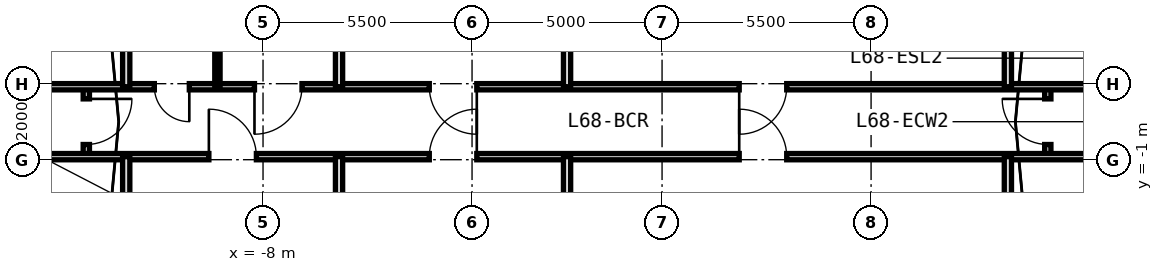
"""IFC4 building model, lengths in metres.
Left out: names, types, materials, properties, quantities, classifications, styles, units other than length and angle.
Written with IfcOpenShell. Run it as: python <this file> out.ifc"""

import sys

from ifc_helpers import new_model, si_unit, direction, frame, frame_2d, origin, place, context, subcontext, project, spatial, rectangle, extrude, source, transform, mapped, element, fill, save


model = new_model("IFC4")
c1 = context("Model", 3, precision=1e-05, world=origin(), true_north=direction((0.0, 1.0)))
c2 = subcontext(c1, "Body", "Model", "MODEL_VIEW")
j1 = project(units=[si_unit("LENGTHUNIT", "METRE"), si_unit("PLANEANGLEUNIT", "RADIAN")], contexts=[c1])
p1 = place(None, origin())
s1 = spatial("IfcSite", under=j1, at=p1, CompositionType="ELEMENT")
p2 = place(p1, origin())
s2 = spatial("IfcBuilding", under=s1, at=p2, CompositionType="ELEMENT")
p3 = place(p2, frame((0.0, 0.0, 220.0)))
s3 = spatial("IfcBuildingStorey", under=s2, at=p3, CompositionType="ELEMENT", Elevation=220.0)
m1 = source(origin(), c2, "Body", "SweptSolid", [
    extrude(rectangle(XDim=1.84, YDim=0.165, at=frame_2d((0.92, 0.0))), origin(), (0.0, 0.0, 1.0), 2.745),
])
p4 = place(p3, frame((-12.65, -0.92, 0.0), z_axis=(0.0, 0.0, 1.0), x_axis=(0.0, 1.0, 0.0)))
e1 = element("IfcWall", 1, at=p4, inside=s3, PredefinedType="PARTITIONING", context=c2, shape_type="MappedRepresentation", body=[
    mapped(m1, transform((0.0, 0.0, 0.0), x_axis=(1.0, 0.0, 0.0), y_axis=(0.0, 1.0, 0.0), z_axis=(0.0, 0.0, 1.0), scale=1.0)),
])
p5 = place(p4, frame((0.32, 0.0, 0.0)))
e2 = element("IfcOpeningElement", 2, at=p5, cuts=e1, PredefinedType="OPENING", context=c2, shape_type="SweptSolid", body=[
    extrude(rectangle(XDim=1.2, YDim=2.15, at=frame_2d((0.6, 1.075))), frame((0.0, 0.093, 0.0), z_axis=(0.0, -1.0, 0.0), x_axis=(1.0, 0.0, 0.0)), (0.0, 0.0, 1.0), 0.185),
])
p6 = place(p3, frame((12.65, -0.92, 0.0), z_axis=(0.0, 0.0, 1.0), x_axis=(0.0, 1.0, 0.0)))
e3 = element("IfcWall", 3, at=p6, inside=s3, PredefinedType="PARTITIONING", context=c2, shape_type="MappedRepresentation", body=[
    mapped(m1, transform((0.0, 0.0, 0.0), x_axis=(1.0, 0.0, 0.0), y_axis=(0.0, 1.0, 0.0), z_axis=(0.0, 0.0, 1.0), scale=1.0)),
])
p7 = place(p6, frame((0.32, 0.0, 0.0)))
e4 = element("IfcOpeningElement", 4, at=p7, cuts=e3, PredefinedType="OPENING", context=c2, shape_type="SweptSolid", body=[
    extrude(rectangle(XDim=1.2, YDim=2.15, at=frame_2d((0.6, 1.075))), frame((0.0, 0.093, 0.0), z_axis=(0.0, -1.0, 0.0), x_axis=(1.0, 0.0, 0.0)), (0.0, 0.0, 1.0), 0.185),
])
m2 = source(origin(), c2, "Body", "SweptSolid", [
    extrude(rectangle(XDim=37.0, YDim=0.165, at=frame_2d((18.5, 0.0))), origin(), (0.0, 0.0, 1.0), 2.745),
])
p8 = place(p3, frame((-18.5, -0.92, 0.0), z_axis=(0.0, 0.0, 1.0), x_axis=(1.0, 0.0, 0.0)))
e5 = element("IfcWall", 5, at=p8, inside=s3, PredefinedType="PARTITIONING", context=c2, shape_type="MappedRepresentation", body=[
    mapped(m2, transform((0.0, 0.0, 0.0), x_axis=(1.0, 0.0, 0.0), y_axis=(0.0, 1.0, 0.0), z_axis=(0.0, 0.0, 1.0), scale=1.0)),
])
p9 = place(p8, frame((2.662, 0.0, 0.0)))
e6 = element("IfcOpeningElement", 6, at=p9, cuts=e5, PredefinedType="OPENING", context=c2, shape_type="SweptSolid", body=[
    extrude(rectangle(XDim=0.95, YDim=2.1, at=frame_2d((0.475, 1.05))), frame((0.0, 0.093, 0.0), z_axis=(0.0, -1.0, 0.0), x_axis=(1.0, 0.0, 0.0)), (0.0, 0.0, 1.0), 0.185),
])
p10 = place(p8, frame((33.388, 0.0, 0.0)))
e7 = element("IfcOpeningElement", 7, at=p10, cuts=e5, PredefinedType="OPENING", context=c2, shape_type="SweptSolid", body=[
    extrude(rectangle(XDim=0.95, YDim=2.1, at=frame_2d((0.475, 1.05))), frame((0.0, 0.093, 0.0), z_axis=(0.0, -1.0, 0.0), x_axis=(1.0, 0.0, 0.0)), (0.0, 0.0, 1.0), 0.185),
])
p11 = place(p8, frame((9.075, 0.0, 0.0)))
e8 = element("IfcOpeningElement", 8, at=p11, cuts=e5, PredefinedType="OPENING", context=c2, shape_type="SweptSolid", body=[
    extrude(rectangle(XDim=1.25, YDim=2.2, at=frame_2d((0.625, 1.1))), frame((0.0, 0.093, 0.0), z_axis=(0.0, -1.0, 0.0), x_axis=(1.0, 0.0, 0.0)), (0.0, 0.0, 1.0), 0.185),
])
p12 = place(p8, frame((14.875, 0.0, 0.0)))
e9 = element("IfcOpeningElement", 9, at=p12, cuts=e5, PredefinedType="OPENING", context=c2, shape_type="SweptSolid", body=[
    extrude(rectangle(XDim=1.25, YDim=2.2, at=frame_2d((0.625, 1.1))), frame((0.0, 0.093, 0.0), z_axis=(0.0, -1.0, 0.0), x_axis=(1.0, 0.0, 0.0)), (0.0, 0.0, 1.0), 0.185),
])
p13 = place(p8, frame((23.03, 0.0, 0.0)))
e10 = element("IfcOpeningElement", 10, at=p13, cuts=e5, PredefinedType="OPENING", context=c2, shape_type="SweptSolid", body=[
    extrude(rectangle(XDim=1.25, YDim=2.2, at=frame_2d((0.625, 1.1))), frame((0.0, 0.093, 0.0), z_axis=(0.0, -1.0, 0.0), x_axis=(1.0, 0.0, 0.0)), (0.0, 0.0, 1.0), 0.185),
])
p14 = place(p3, frame((-18.5, 0.92, 0.0), z_axis=(0.0, 0.0, 1.0), x_axis=(1.0, 0.0, 0.0)))
e11 = element("IfcWall", 11, at=p14, inside=s3, PredefinedType="PARTITIONING", context=c2, shape_type="MappedRepresentation", body=[
    mapped(m2, transform((0.0, 0.0, 0.0), x_axis=(1.0, 0.0, 0.0), y_axis=(0.0, 1.0, 0.0), z_axis=(0.0, 0.0, 1.0), scale=1.0)),
])
p15 = place(p14, frame((2.662, 0.0, 0.0)))
e12 = element("IfcOpeningElement", 12, at=p15, cuts=e11, PredefinedType="OPENING", context=c2, shape_type="SweptSolid", body=[
    extrude(rectangle(XDim=0.95, YDim=2.1, at=frame_2d((0.475, 1.05))), frame((0.0, 0.093, 0.0), z_axis=(0.0, -1.0, 0.0), x_axis=(1.0, 0.0, 0.0)), (0.0, 0.0, 1.0), 0.185),
])
p16 = place(p14, frame((33.388, 0.0, 0.0)))
e13 = element("IfcOpeningElement", 13, at=p16, cuts=e11, PredefinedType="OPENING", context=c2, shape_type="SweptSolid", body=[
    extrude(rectangle(XDim=0.95, YDim=2.1, at=frame_2d((0.475, 1.05))), frame((0.0, 0.093, 0.0), z_axis=(0.0, -1.0, 0.0), x_axis=(1.0, 0.0, 0.0)), (0.0, 0.0, 1.0), 0.185),
])
p17 = place(p14, frame((7.64, 0.0, 0.0)))
e14 = element("IfcOpeningElement", 14, at=p17, cuts=e11, PredefinedType="OPENING", context=c2, shape_type="SweptSolid", body=[
    extrude(rectangle(XDim=0.92, YDim=2.1, at=frame_2d((0.46, 1.05))), frame((0.0, 0.093, 0.0), z_axis=(0.0, -1.0, 0.0), x_axis=(1.0, 0.0, 0.0)), (0.0, 0.0, 1.0), 0.185),
])
p18 = place(p14, frame((10.275, 0.0, 0.0)))
e15 = element("IfcOpeningElement", 15, at=p18, cuts=e11, PredefinedType="OPENING", context=c2, shape_type="SweptSolid", body=[
    extrude(rectangle(XDim=1.25, YDim=2.2, at=frame_2d((0.625, 1.1))), frame((0.0, 0.093, 0.0), z_axis=(0.0, -1.0, 0.0), x_axis=(1.0, 0.0, 0.0)), (0.0, 0.0, 1.0), 0.185),
])
p19 = place(p14, frame((14.875, 0.0, 0.0)))
e16 = element("IfcOpeningElement", 16, at=p19, cuts=e11, PredefinedType="OPENING", context=c2, shape_type="SweptSolid", body=[
    extrude(rectangle(XDim=1.25, YDim=2.2, at=frame_2d((0.625, 1.1))), frame((0.0, 0.093, 0.0), z_axis=(0.0, -1.0, 0.0), x_axis=(1.0, 0.0, 0.0)), (0.0, 0.0, 1.0), 0.185),
])
p20 = place(p14, frame((23.03, 0.0, 0.0)))
e17 = element("IfcOpeningElement", 17, at=p20, cuts=e11, PredefinedType="OPENING", context=c2, shape_type="SweptSolid", body=[
    extrude(rectangle(XDim=1.25, YDim=2.2, at=frame_2d((0.625, 1.1))), frame((0.0, 0.093, 0.0), z_axis=(0.0, -1.0, 0.0), x_axis=(1.0, 0.0, 0.0)), (0.0, 0.0, 1.0), 0.185),
])
m3 = source(origin(), c2, "Body", "SweptSolid", [
    extrude(rectangle(XDim=9.88, YDim=0.19, at=frame_2d((4.94, 0.0))), origin(), (0.0, 0.0, 1.0), 2.745),
])
for number, where, z_axis, x_axis in (
    (18, (-11.6, -10.8, 0.0), (0.0, 0.0, 1.0), (0.0, 1.0, 0.0)),
    (19, (-11.6, 0.92, 0.0), (0.0, 0.0, 1.0), (0.0, 1.0, 0.0)),
    (20, (11.6, -10.8, 0.0), (0.0, 0.0, 1.0), (0.0, 1.0, 0.0)),
    (21, (11.6, 0.92, 0.0), (0.0, 0.0, 1.0), (0.0, 1.0, 0.0)),
):
    element("IfcWall", number, at=place(p3, frame(where, z_axis=z_axis, x_axis=x_axis)), inside=s3, PredefinedType="PARTITIONING", context=c2, shape_type="MappedRepresentation", body=[
        mapped(m3, transform((0.0, 0.0, 0.0), x_axis=(1.0, 0.0, 0.0), y_axis=(0.0, 1.0, 0.0), z_axis=(0.0, 0.0, 1.0), scale=1.0)),
    ])
m4 = source(origin(), c2, "Body", "SweptSolid", [
    extrude(rectangle(XDim=9.88, YDim=0.19, at=frame_2d((4.94, 0.0))), origin(), (0.0, 0.0, 1.0), 2.045),
])
for number, where, z_axis, x_axis in (
    (22, (-6.0, -10.8, 0.0), (0.0, 0.0, 1.0), (0.0, 1.0, 0.0)),
    (23, (-6.0, 0.92, 0.0), (0.0, 0.0, 1.0), (0.0, 1.0, 0.0)),
):
    element("IfcWall", number, at=place(p3, frame(where, z_axis=z_axis, x_axis=x_axis)), inside=s3, PredefinedType="PARTITIONING", context=c2, shape_type="MappedRepresentation", body=[
        mapped(m4, transform((0.0, 0.0, 0.0), x_axis=(1.0, 0.0, 0.0), y_axis=(0.0, 1.0, 0.0), z_axis=(0.0, 0.0, 1.0), scale=1.0)),
    ])
m5 = source(origin(), c2, "Body", "SweptSolid", [
    extrude(rectangle(XDim=9.88, YDim=0.14, at=frame_2d((4.94, 0.0))), origin(), (0.0, 0.0, 1.0), 2.745),
])
p21 = place(p3, frame((-9.2, 0.92, 0.0), z_axis=(0.0, 0.0, 1.0), x_axis=(0.0, 1.0, 0.0)))
e24 = element("IfcWall", 24, at=p21, inside=s3, PredefinedType="PARTITIONING", context=c2, shape_type="MappedRepresentation", body=[
    mapped(m5, transform((0.0, 0.0, 0.0), x_axis=(1.0, 0.0, 0.0), y_axis=(0.0, 1.0, 0.0), z_axis=(0.0, 0.0, 1.0), scale=1.0)),
])
for number, where, z_axis, x_axis in (
    (25, (0.0, -10.8, 0.0), (0.0, 0.0, 1.0), (0.0, 1.0, 0.0)),
    (26, (0.0, 0.92, 0.0), (0.0, 0.0, 1.0), (0.0, 1.0, 0.0)),
):
    element("IfcWall", number, at=place(p3, frame(where, z_axis=z_axis, x_axis=x_axis)), inside=s3, PredefinedType="PARTITIONING", context=c2, shape_type="MappedRepresentation", body=[
        mapped(m4, transform((0.0, 0.0, 0.0), x_axis=(1.0, 0.0, 0.0), y_axis=(0.0, 1.0, 0.0), z_axis=(0.0, 0.0, 1.0), scale=1.0)),
    ])
m6 = source(origin(), c2, "Body", "SweptSolid", [
    extrude(rectangle(XDim=1.2, YDim=2.15, at=frame_2d((0.6, 1.075))), frame((0.0, 0.025, 0.0), z_axis=(0.0, -1.0, 0.0), x_axis=(1.0, 0.0, 0.0)), (0.0, 0.0, 1.0), 0.05),
])
p22 = place(p5, frame((1.2, 0.0, 0.0), z_axis=(0.0, 0.0, 1.0), x_axis=(-1.0, 0.0, 0.0)))
e27 = element("IfcDoor", 27, at=p22, inside=s3, OperationType="SINGLE_SWING_LEFT", PredefinedType="DOOR", context=c2, shape_type="MappedRepresentation", body=[
    mapped(m6, transform((0.0, 0.0, 0.0), x_axis=(1.0, 0.0, 0.0), y_axis=(0.0, 1.0, 0.0), z_axis=(0.0, 0.0, 1.0), scale=1.0)),
])
fill(e2, e27)
p23 = place(p7, origin())
e28 = element("IfcDoor", 28, at=p23, inside=s3, OperationType="SINGLE_SWING_RIGHT", PredefinedType="DOOR", context=c2, shape_type="MappedRepresentation", body=[
    mapped(m6, transform((0.0, 0.0, 0.0), x_axis=(1.0, 0.0, 0.0), y_axis=(0.0, 1.0, 0.0), z_axis=(0.0, 0.0, 1.0), scale=1.0)),
])
fill(e4, e28)
m7 = source(origin(), c2, "Body", "SweptSolid", [
    extrude(rectangle(XDim=1.25, YDim=2.2, at=frame_2d((0.625, 1.1))), frame((0.0, 0.025, 0.0), z_axis=(0.0, -1.0, 0.0), x_axis=(1.0, 0.0, 0.0)), (0.0, 0.0, 1.0), 0.05),
])
p24 = place(p11, origin())
e29 = element("IfcDoor", 29, at=p24, inside=s3, OperationType="SINGLE_SWING_LEFT", PredefinedType="DOOR", context=c2, shape_type="MappedRepresentation", body=[
    mapped(m7, transform((0.0, 0.0, 0.0), x_axis=(1.0, 0.0, 0.0), y_axis=(0.0, 1.0, 0.0), z_axis=(0.0, 0.0, 1.0), scale=1.0)),
])
fill(e8, e29)
m8 = source(origin(), c2, "Body", "SweptSolid", [
    extrude(rectangle(XDim=0.92, YDim=2.1, at=frame_2d((0.46, 1.05))), frame((0.0, 0.025, 0.0), z_axis=(0.0, -1.0, 0.0), x_axis=(1.0, 0.0, 0.0)), (0.0, 0.0, 1.0), 0.05),
])
p25 = place(p17, frame((0.92, 0.0, 0.0), z_axis=(0.0, 0.0, 1.0), x_axis=(-1.0, 0.0, 0.0)))
e30 = element("IfcDoor", 30, at=p25, inside=s3, OperationType="SINGLE_SWING_LEFT", PredefinedType="DOOR", context=c2, shape_type="MappedRepresentation", body=[
    mapped(m8, transform((0.0, 0.0, 0.0), x_axis=(1.0, 0.0, 0.0), y_axis=(0.0, 1.0, 0.0), z_axis=(0.0, 0.0, 1.0), scale=1.0)),
])
fill(e14, e30)
p26 = place(p18, frame((1.25, 0.0, 0.0), z_axis=(0.0, 0.0, 1.0), x_axis=(-1.0, 0.0, 0.0)))
e31 = element("IfcDoor", 31, at=p26, inside=s3, OperationType="SINGLE_SWING_RIGHT", PredefinedType="DOOR", context=c2, shape_type="MappedRepresentation", body=[
    mapped(m7, transform((0.0, 0.0, 0.0), x_axis=(1.0, 0.0, 0.0), y_axis=(0.0, 1.0, 0.0), z_axis=(0.0, 0.0, 1.0), scale=1.0)),
])
fill(e15, e31)
p27 = place(p12, origin())
e32 = element("IfcDoor", 32, at=p27, inside=s3, OperationType="SINGLE_SWING_RIGHT", PredefinedType="DOOR", context=c2, shape_type="MappedRepresentation", body=[
    mapped(m7, transform((0.0, 0.0, 0.0), x_axis=(1.0, 0.0, 0.0), y_axis=(0.0, 1.0, 0.0), z_axis=(0.0, 0.0, 1.0), scale=1.0)),
])
fill(e9, e32)
p28 = place(p19, frame((1.25, 0.0, 0.0), z_axis=(0.0, 0.0, 1.0), x_axis=(-1.0, 0.0, 0.0)))
e33 = element("IfcDoor", 33, at=p28, inside=s3, OperationType="SINGLE_SWING_LEFT", PredefinedType="DOOR", context=c2, shape_type="MappedRepresentation", body=[
    mapped(m7, transform((0.0, 0.0, 0.0), x_axis=(1.0, 0.0, 0.0), y_axis=(0.0, 1.0, 0.0), z_axis=(0.0, 0.0, 1.0), scale=1.0)),
])
fill(e16, e33)
p29 = place(p13, origin())
e34 = element("IfcDoor", 34, at=p29, inside=s3, OperationType="SINGLE_SWING_LEFT", PredefinedType="DOOR", context=c2, shape_type="MappedRepresentation", body=[
    mapped(m7, transform((0.0, 0.0, 0.0), x_axis=(1.0, 0.0, 0.0), y_axis=(0.0, 1.0, 0.0), z_axis=(0.0, 0.0, 1.0), scale=1.0)),
])
fill(e10, e34)
p30 = place(p20, frame((1.25, 0.0, 0.0), z_axis=(0.0, 0.0, 1.0), x_axis=(-1.0, 0.0, 0.0)))
e35 = element("IfcDoor", 35, at=p30, inside=s3, OperationType="SINGLE_SWING_RIGHT", PredefinedType="DOOR", context=c2, shape_type="MappedRepresentation", body=[
    mapped(m7, transform((0.0, 0.0, 0.0), x_axis=(1.0, 0.0, 0.0), y_axis=(0.0, 1.0, 0.0), z_axis=(0.0, 0.0, 1.0), scale=1.0)),
])
fill(e17, e35)
save(model, sys.argv[1])
